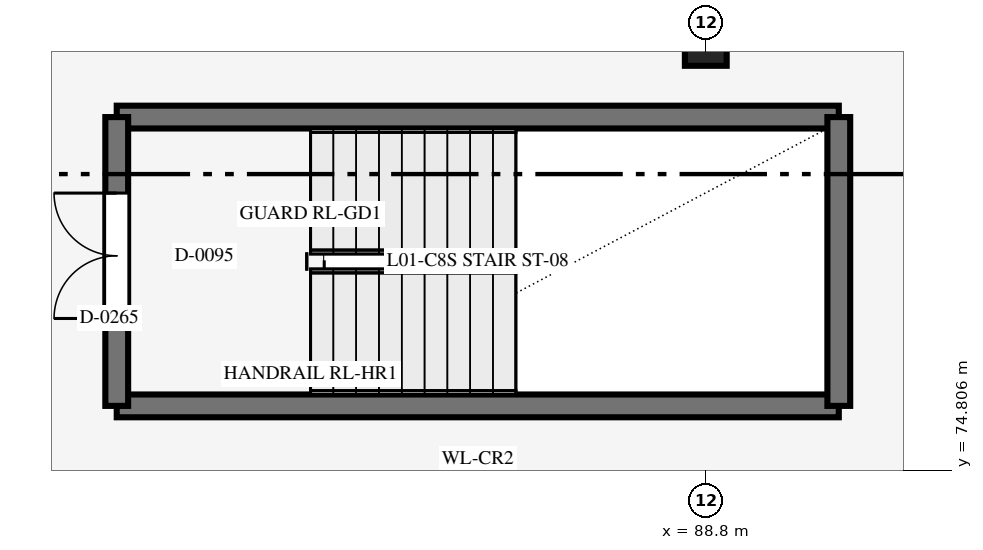
"""IFC4 building model, lengths in metres.
Left out: names, types, materials, properties, quantities, classifications, styles, units other than length and angle.
Written with IfcOpenShell. Run it as: python <this file> out.ifc"""

import sys

from ifc_helpers import new_model, si_unit, direction, frame, frame_2d, origin, origin_2d, place, context, subcontext, project, spatial, rectangle, extrude, element, fill, save


model = new_model("IFC4")
c1 = context("Model", 3, precision=1e-05, world=origin(), true_north=direction((0.0, 1.0)))
c2 = subcontext(c1, "Body", "Model", "MODEL_VIEW")
j1 = project(units=[si_unit("LENGTHUNIT", "METRE"), si_unit("PLANEANGLEUNIT", "RADIAN")], contexts=[c1])
p1 = place(None, origin())
s1 = spatial("IfcSite", under=j1, at=p1, CompositionType="ELEMENT")
p2 = place(p1, origin())
s2 = spatial("IfcBuilding", under=s1, at=p2, CompositionType="ELEMENT")
p3 = place(p2, frame((0.0, 0.0, 6.0)))
s3 = spatial("IfcBuildingStorey", under=s2, at=p3, CompositionType="ELEMENT", Elevation=6.0)
p4 = place(p3, frame((88.8, 80.4, 0.0), z_axis=(0.0, 0.0, 1.0), x_axis=(1.0, 0.0, 0.0)))
e1 = element("IfcColumn", 1, at=p4, inside=s3, PredefinedType="COLUMN", context=c2, shape_type="SweptSolid", body=[
    extrude(rectangle(XDim=0.55, YDim=0.55, at=origin_2d()), origin(), (0.0, 0.0, 1.0), 6.0),
])
for number, where, z_axis, x_axis in (
    (2, (90.55, 75.65, 0.0), (0.0, 0.0, 1.0), (-1.0, 0.0, 0.0)),
    (3, (81.05, 79.45, 0.0), (0.0, 0.0, 1.0), (1.0, 0.0, 0.0)),
):
    element("IfcWall", number, at=place(p3, frame(where, z_axis=z_axis, x_axis=x_axis)), inside=s3, PredefinedType="SHEAR", context=c2, shape_type="SweptSolid", body=[
        extrude(rectangle(XDim=9.5, YDim=0.3, at=frame_2d((4.75, 0.0))), origin(), (0.0, 0.0, 1.0), 6.0),
    ])
p5 = place(p3, frame((81.05, 75.65, 0.0), z_axis=(0.0, 0.0, 1.0), x_axis=(0.0, 1.0, 0.0)))
e4 = element("IfcWall", 4, at=p5, inside=s3, PredefinedType="SHEAR", context=c2, shape_type="SweptSolid", body=[
    extrude(rectangle(XDim=3.8, YDim=0.3, at=frame_2d((1.9, 0.0))), origin(), (0.0, 0.0, 1.0), 6.0),
])
p6 = place(p5, frame((1.15, 0.0, 0.0)))
e5 = element("IfcOpeningElement", 5, at=p6, cuts=e4, PredefinedType="OPENING", context=c2, shape_type="SweptSolid", body=[
    extrude(rectangle(XDim=1.65, YDim=2.2, at=frame_2d((0.825, 1.1))), frame((0.0, 0.16, 0.0), z_axis=(0.0, -1.0, 0.0), x_axis=(1.0, 0.0, 0.0)), (0.0, 0.0, 1.0), 0.32),
])
p7 = place(p3, frame((90.55, 75.65, 0.0), z_axis=(0.0, 0.0, 1.0), x_axis=(0.0, 1.0, 0.0)))
e6 = element("IfcWall", 6, at=p7, inside=s3, PredefinedType="SHEAR", context=c2, shape_type="SweptSolid", body=[
    extrude(rectangle(XDim=3.8, YDim=0.3, at=frame_2d((1.9, 0.0))), origin(), (0.0, 0.0, 1.0), 6.0),
])
p8 = place(p6, origin())
e7 = element("IfcDoor", 7, at=p8, inside=s3, OperationType="DOUBLE_DOOR_SINGLE_SWING", PredefinedType="DOOR", context=c2, shape_type="SweptSolid", body=[
    extrude(rectangle(XDim=1.65, YDim=2.2, at=frame_2d((0.825, 1.1))), frame((0.0, 0.025, 0.0), z_axis=(0.0, -1.0, 0.0), x_axis=(1.0, 0.0, 0.0)), (0.0, 0.0, 1.0), 0.05),
])
fill(e5, e7)
save(model, sys.argv[1])
